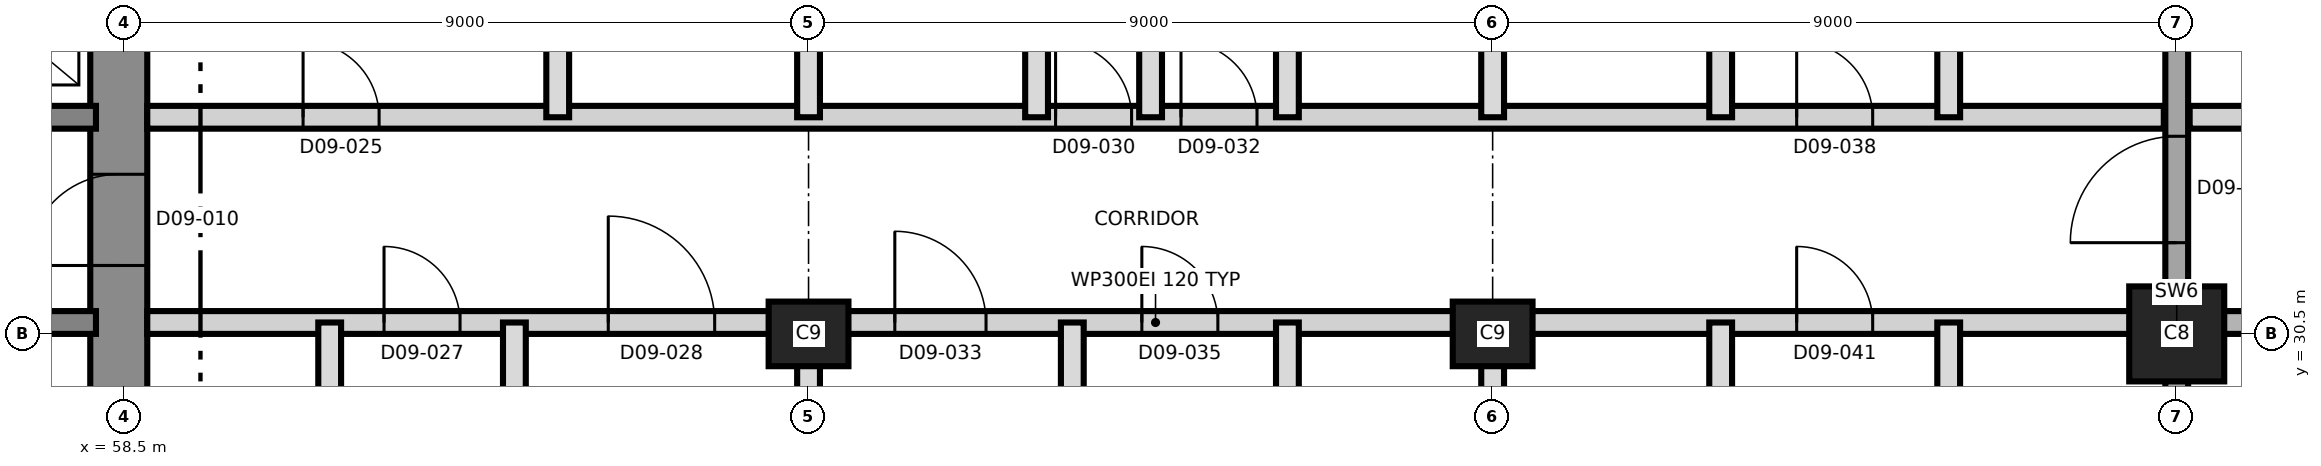
"""IFC4 building model, lengths in metres.
Left out: names, types, materials, properties, quantities, classifications, styles, units other than length and angle.
Written with IfcOpenShell. Run it as: python <this file> out.ifc"""

import sys

from ifc_helpers import new_model, si_unit, direction, frame, frame_2d, origin, origin_2d, place, context, subcontext, project, spatial, rectangle, extrude, element, fill, save


model = new_model("IFC4")
c1 = context("Model", 3, precision=1e-05, world=origin(), true_north=direction((0.0, 1.0)))
c2 = subcontext(c1, "Body", "Model", "MODEL_VIEW")
j1 = project(units=[si_unit("LENGTHUNIT", "METRE"), si_unit("PLANEANGLEUNIT", "RADIAN")], contexts=[c1])
p1 = place(None, origin())
s1 = spatial("IfcSite", under=j1, at=p1, CompositionType="ELEMENT")
p2 = place(p1, origin())
s2 = spatial("IfcBuilding", under=s1, at=p2, CompositionType="ELEMENT")
p3 = place(p2, frame((0.0, 0.0, 113.0)))
s3 = spatial("IfcBuildingStorey", under=s2, at=p3, CompositionType="ELEMENT", Elevation=113.0)
p4 = place(p3, frame((58.425, 21.125, 0.0), z_axis=(0.0, 0.0, 1.0), x_axis=(0.0, 1.0, 0.0)))
e1 = element("IfcWall", 1, at=p4, inside=s3, PredefinedType="SHEAR", context=c2, shape_type="SweptSolid", body=[
    extrude(rectangle(XDim=18.75, YDim=0.75, at=frame_2d((9.375, 0.0))), origin(), (0.0, 0.0, 1.0), 3.7),
])
p5 = place(p4, frame((10.275, 0.0, 0.0)))
e2 = element("IfcOpeningElement", 2, at=p5, cuts=e1, PredefinedType="OPENING", context=c2, shape_type="SweptSolid", body=[
    extrude(rectangle(XDim=1.2, YDim=2.1, at=frame_2d((0.6, 1.05))), frame((0.0, 0.385, 0.0), z_axis=(0.0, -1.0, 0.0), x_axis=(1.0, 0.0, 0.0)), (0.0, 0.0, 1.0), 0.77),
])
p6 = place(p3, frame((31.875, 30.65, 0.0), z_axis=(0.0, 0.0, 1.0), x_axis=(1.0, 0.0, 0.0)))
e3 = element("IfcWall", 3, at=p6, inside=s3, PredefinedType="SHEAR", context=c2, shape_type="SweptSolid", body=[
    extrude(rectangle(XDim=26.25, YDim=0.3, at=frame_2d((13.125, 0.0))), origin(), (0.0, 0.0, 1.0), 3.7),
])
p7 = place(p6, frame((24.625, 0.0, 0.0)))
e4 = element("IfcOpeningElement", 4, at=p7, cuts=e3, PredefinedType="OPENING", context=c2, shape_type="SweptSolid", body=[
    extrude(rectangle(XDim=1.0, YDim=2.1, at=frame_2d((0.5, 1.05))), frame((0.0, 0.16, 0.0), z_axis=(0.0, -1.0, 0.0), x_axis=(1.0, 0.0, 0.0)), (0.0, 0.0, 1.0), 0.32),
])
p8 = place(p6, frame((11.425, 0.0, 0.0)))
e5 = element("IfcOpeningElement", 5, at=p8, cuts=e3, PredefinedType="OPENING", context=c2, shape_type="SweptSolid", body=[
    extrude(rectangle(XDim=1.0, YDim=2.1, at=frame_2d((0.5, 1.05))), frame((0.0, 0.16, 0.0), z_axis=(0.0, -1.0, 0.0), x_axis=(1.0, 0.0, 0.0)), (0.0, 0.0, 1.0), 0.32),
])
p9 = place(p3, frame((31.875, 33.35, 0.0), z_axis=(0.0, 0.0, 1.0), x_axis=(1.0, 0.0, 0.0)))
e6 = element("IfcWall", 6, at=p9, inside=s3, PredefinedType="SHEAR", context=c2, shape_type="SweptSolid", body=[
    extrude(rectangle(XDim=26.25, YDim=0.3, at=frame_2d((13.125, 0.0))), origin(), (0.0, 0.0, 1.0), 3.7),
])
p10 = place(p9, frame((13.775, 0.0, 0.0)))
e7 = element("IfcOpeningElement", 7, at=p10, cuts=e6, PredefinedType="OPENING", context=c2, shape_type="SweptSolid", body=[
    extrude(rectangle(XDim=1.4, YDim=2.1, at=frame_2d((0.7, 1.05))), frame((0.0, 0.16, 0.0), z_axis=(0.0, -1.0, 0.0), x_axis=(1.0, 0.0, 0.0)), (0.0, 0.0, 1.0), 0.32),
])
p11 = place(p9, frame((5.25, 0.0, 0.0)))
e8 = element("IfcOpeningElement", 8, at=p11, cuts=e6, PredefinedType="OPENING", context=c2, shape_type="SweptSolid", body=[
    extrude(rectangle(XDim=1.2, YDim=2.1, at=frame_2d((0.6, 1.05))), frame((0.0, 0.16, 0.0), z_axis=(0.0, -1.0, 0.0), x_axis=(1.0, 0.0, 0.0)), (0.0, 0.0, 1.0), 0.32),
])
p12 = place(p9, frame((19.8, 0.0, 0.0)))
e9 = element("IfcOpeningElement", 9, at=p12, cuts=e6, PredefinedType="OPENING", context=c2, shape_type="SweptSolid", body=[
    extrude(rectangle(XDim=1.2, YDim=2.1, at=frame_2d((0.6, 1.05))), frame((0.0, 0.16, 0.0), z_axis=(0.0, -1.0, 0.0), x_axis=(1.0, 0.0, 0.0)), (0.0, 0.0, 1.0), 0.32),
])
for number, where, z_axis, x_axis in (
    (10, (67.5, 30.5, 0.0), (0.0, 0.0, 1.0), (1.0, 0.0, 0.0)),
    (11, (76.5, 30.5, 0.0), (0.0, 0.0, 1.0), (1.0, 0.0, 0.0)),
):
    element("IfcColumn", number, at=place(p3, frame(where, z_axis=z_axis, x_axis=x_axis)), inside=s3, PredefinedType="COLUMN", context=c2, shape_type="SweptSolid", body=[
        extrude(rectangle(XDim=1.05, YDim=0.85, at=origin_2d()), origin(), (0.0, 0.0, 1.0), 3.7),
    ])
p13 = place(p3, frame((85.5, 30.5, 0.0), z_axis=(0.0, 0.0, 1.0), x_axis=(1.0, 0.0, 0.0)))
e12 = element("IfcColumn", 12, at=p13, inside=s3, PredefinedType="COLUMN", context=c2, shape_type="SweptSolid", body=[
    extrude(rectangle(XDim=1.25, YDim=1.25, at=origin_2d()), origin(), (0.0, 0.0, 1.0), 3.7),
])
p14 = place(p3, frame((85.5, 20.35, 0.0), z_axis=(0.0, 0.0, 1.0), x_axis=(0.0, 1.0, 0.0)))
e13 = element("IfcWall", 13, at=p14, inside=s3, PredefinedType="SHEAR", context=c2, shape_type="SweptSolid", body=[
    extrude(rectangle(XDim=20.3, YDim=0.3, at=frame_2d((10.15, 0.0))), origin(), (0.0, 0.0, 1.0), 3.7),
])
p15 = place(p14, frame((11.35, 0.0, 0.0)))
e14 = element("IfcOpeningElement", 14, at=p15, cuts=e13, PredefinedType="OPENING", context=c2, shape_type="SweptSolid", body=[
    extrude(rectangle(XDim=1.4, YDim=2.1, at=frame_2d((0.7, 1.05))), frame((0.0, 0.16, 0.0), z_axis=(0.0, -1.0, 0.0), x_axis=(1.0, 0.0, 0.0)), (0.0, 0.0, 1.0), 0.32),
])
p16 = place(p3, frame((58.8, 30.65, 0.0), z_axis=(0.0, 0.0, 1.0), x_axis=(1.0, 0.0, 0.0)))
e15 = element("IfcWall", 15, at=p16, inside=s3, PredefinedType="PARTITIONING", context=c2, shape_type="SweptSolid", body=[
    extrude(rectangle(XDim=26.53, YDim=0.3, at=frame_2d((13.265, 0.0))), origin(), (0.0, 0.0, 1.0), 3.4),
])
p17 = place(p16, frame((3.115, 0.0, 0.0)))
e16 = element("IfcOpeningElement", 16, at=p17, cuts=e15, PredefinedType="OPENING", context=c2, shape_type="SweptSolid", body=[
    extrude(rectangle(XDim=1.0, YDim=2.1, at=frame_2d((0.5, 1.05))), frame((0.0, 0.16, 0.0), z_axis=(0.0, -1.0, 0.0), x_axis=(1.0, 0.0, 0.0)), (0.0, 0.0, 1.0), 0.32),
])
p18 = place(p16, frame((6.065, 0.0, 0.0)))
e17 = element("IfcOpeningElement", 17, at=p18, cuts=e15, PredefinedType="OPENING", context=c2, shape_type="SweptSolid", body=[
    extrude(rectangle(XDim=1.4, YDim=2.1, at=frame_2d((0.7, 1.05))), frame((0.0, 0.16, 0.0), z_axis=(0.0, -1.0, 0.0), x_axis=(1.0, 0.0, 0.0)), (0.0, 0.0, 1.0), 0.32),
])
p19 = place(p16, frame((9.835, 0.0, 0.0)))
e18 = element("IfcOpeningElement", 18, at=p19, cuts=e15, PredefinedType="OPENING", context=c2, shape_type="SweptSolid", body=[
    extrude(rectangle(XDim=1.2, YDim=2.1, at=frame_2d((0.6, 1.05))), frame((0.0, 0.16, 0.0), z_axis=(0.0, -1.0, 0.0), x_axis=(1.0, 0.0, 0.0)), (0.0, 0.0, 1.0), 0.32),
])
p20 = place(p16, frame((13.085, 0.0, 0.0)))
e19 = element("IfcOpeningElement", 19, at=p20, cuts=e15, PredefinedType="OPENING", context=c2, shape_type="SweptSolid", body=[
    extrude(rectangle(XDim=1.0, YDim=2.1, at=frame_2d((0.5, 1.05))), frame((0.0, 0.16, 0.0), z_axis=(0.0, -1.0, 0.0), x_axis=(1.0, 0.0, 0.0)), (0.0, 0.0, 1.0), 0.32),
])
p21 = place(p16, frame((21.7, 0.0, 0.0)))
e20 = element("IfcOpeningElement", 20, at=p21, cuts=e15, PredefinedType="OPENING", context=c2, shape_type="SweptSolid", body=[
    extrude(rectangle(XDim=1.0, YDim=2.4, at=frame_2d((0.5, 1.2))), frame((0.0, 0.16, 0.0), z_axis=(0.0, -1.0, 0.0), x_axis=(1.0, 0.0, 0.0)), (0.0, 0.0, 1.0), 0.32),
])
p22 = place(p3, frame((85.67, 30.65, 0.0), z_axis=(0.0, 0.0, 1.0), x_axis=(1.0, 0.0, 0.0)))
e21 = element("IfcWall", 21, at=p22, inside=s3, PredefinedType="SHEAR", context=c2, shape_type="SweptSolid", body=[
    extrude(rectangle(XDim=9.58, YDim=0.3, at=frame_2d((4.79, 0.0))), origin(), (0.0, 0.0, 1.0), 3.4),
])
p23 = place(p22, frame((2.08, 0.0, 0.0)))
e22 = element("IfcOpeningElement", 22, at=p23, cuts=e21, PredefinedType="OPENING", context=c2, shape_type="SweptSolid", body=[
    extrude(rectangle(XDim=1.2, YDim=2.1, at=frame_2d((0.6, 1.05))), frame((0.0, 0.16, 0.0), z_axis=(0.0, -1.0, 0.0), x_axis=(1.0, 0.0, 0.0)), (0.0, 0.0, 1.0), 0.32),
])
p24 = place(p22, frame((5.63, 0.0, 0.0)))
e23 = element("IfcOpeningElement", 23, at=p24, cuts=e21, PredefinedType="OPENING", context=c2, shape_type="SweptSolid", body=[
    extrude(rectangle(XDim=1.0, YDim=2.1, at=frame_2d((0.5, 1.05))), frame((0.0, 0.16, 0.0), z_axis=(0.0, -1.0, 0.0), x_axis=(1.0, 0.0, 0.0)), (0.0, 0.0, 1.0), 0.32),
])
p25 = place(p3, frame((58.8, 33.35, 0.0), z_axis=(0.0, 0.0, 1.0), x_axis=(1.0, 0.0, 0.0)))
e24 = element("IfcWall", 24, at=p25, inside=s3, PredefinedType="PARTITIONING", context=c2, shape_type="SweptSolid", body=[
    extrude(rectangle(XDim=26.53, YDim=0.3, at=frame_2d((13.265, 0.0))), origin(), (0.0, 0.0, 1.0), 3.4),
])
p26 = place(p25, frame((2.05, 0.0, 0.0)))
e25 = element("IfcOpeningElement", 25, at=p26, cuts=e24, PredefinedType="OPENING", context=c2, shape_type="SweptSolid", body=[
    extrude(rectangle(XDim=1.0, YDim=2.4, at=frame_2d((0.5, 1.2))), frame((0.0, 0.16, 0.0), z_axis=(0.0, -1.0, 0.0), x_axis=(1.0, 0.0, 0.0)), (0.0, 0.0, 1.0), 0.32),
])
p27 = place(p25, frame((11.95, 0.0, 0.0)))
e26 = element("IfcOpeningElement", 26, at=p27, cuts=e24, PredefinedType="OPENING", context=c2, shape_type="SweptSolid", body=[
    extrude(rectangle(XDim=1.0, YDim=2.1, at=frame_2d((0.5, 1.05))), frame((0.0, 0.16, 0.0), z_axis=(0.0, -1.0, 0.0), x_axis=(1.0, 0.0, 0.0)), (0.0, 0.0, 1.0), 0.32),
])
p28 = place(p25, frame((13.6, 0.0, 0.0)))
e27 = element("IfcOpeningElement", 27, at=p28, cuts=e24, PredefinedType="OPENING", context=c2, shape_type="SweptSolid", body=[
    extrude(rectangle(XDim=1.0, YDim=2.1, at=frame_2d((0.5, 1.05))), frame((0.0, 0.16, 0.0), z_axis=(0.0, -1.0, 0.0), x_axis=(1.0, 0.0, 0.0)), (0.0, 0.0, 1.0), 0.32),
])
p29 = place(p25, frame((21.7, 0.0, 0.0)))
e28 = element("IfcOpeningElement", 28, at=p29, cuts=e24, PredefinedType="OPENING", context=c2, shape_type="SweptSolid", body=[
    extrude(rectangle(XDim=1.0, YDim=2.4, at=frame_2d((0.5, 1.2))), frame((0.0, 0.16, 0.0), z_axis=(0.0, -1.0, 0.0), x_axis=(1.0, 0.0, 0.0)), (0.0, 0.0, 1.0), 0.32),
])
p30 = place(p3, frame((85.67, 33.35, 0.0), z_axis=(0.0, 0.0, 1.0), x_axis=(1.0, 0.0, 0.0)))
e29 = element("IfcWall", 29, at=p30, inside=s3, PredefinedType="PARTITIONING", context=c2, shape_type="SweptSolid", body=[
    extrude(rectangle(XDim=9.58, YDim=0.3, at=frame_2d((4.79, 0.0))), origin(), (0.0, 0.0, 1.0), 3.4),
])
p31 = place(p30, frame((1.83, 0.0, 0.0)))
e30 = element("IfcOpeningElement", 30, at=p31, cuts=e29, PredefinedType="OPENING", context=c2, shape_type="SweptSolid", body=[
    extrude(rectangle(XDim=1.0, YDim=2.1, at=frame_2d((0.5, 1.05))), frame((0.0, 0.16, 0.0), z_axis=(0.0, -1.0, 0.0), x_axis=(1.0, 0.0, 0.0)), (0.0, 0.0, 1.0), 0.32),
])
p32 = place(p30, frame((5.63, 0.0, 0.0)))
e31 = element("IfcOpeningElement", 31, at=p32, cuts=e29, PredefinedType="OPENING", context=c2, shape_type="SweptSolid", body=[
    extrude(rectangle(XDim=1.0, YDim=2.1, at=frame_2d((0.5, 1.05))), frame((0.0, 0.16, 0.0), z_axis=(0.0, -1.0, 0.0), x_axis=(1.0, 0.0, 0.0)), (0.0, 0.0, 1.0), 0.32),
])
p33 = place(p3, frame((61.2, 27.45, 0.0), z_axis=(0.0, 0.0, 1.0), x_axis=(0.0, 1.0, 0.0)))
e32 = element("IfcWall", 32, at=p33, inside=s3, PredefinedType="PARTITIONING", context=c2, shape_type="SweptSolid", body=[
    extrude(rectangle(XDim=3.2, YDim=0.3, at=frame_2d((1.6, 0.0))), origin(), (0.0, 0.0, 1.0), 3.4),
])
p34 = place(p3, frame((63.63, 20.35, 0.0), z_axis=(0.0, 0.0, 1.0), x_axis=(0.0, 1.0, 0.0)))
e33 = element("IfcWall", 33, at=p34, inside=s3, PredefinedType="PARTITIONING", context=c2, shape_type="SweptSolid", body=[
    extrude(rectangle(XDim=10.3, YDim=0.3, at=frame_2d((5.15, 0.0))), origin(), (0.0, 0.0, 1.0), 3.4),
])
p35 = place(p3, frame((64.2, 33.35, 0.0), z_axis=(0.0, 0.0, 1.0), x_axis=(0.0, 1.0, 0.0)))
e34 = element("IfcWall", 34, at=p35, inside=s3, PredefinedType="PARTITIONING", context=c2, shape_type="SweptSolid", body=[
    extrude(rectangle(XDim=3.5, YDim=0.3, at=frame_2d((1.75, 0.0))), origin(), (0.0, 0.0, 1.0), 3.4),
])
p36 = place(p3, frame((67.5, 20.35, 0.0), z_axis=(0.0, 0.0, 1.0), x_axis=(0.0, 1.0, 0.0)))
e35 = element("IfcWall", 35, at=p36, inside=s3, PredefinedType="PARTITIONING", context=c2, shape_type="SweptSolid", body=[
    extrude(rectangle(XDim=10.3, YDim=0.3, at=frame_2d((5.15, 0.0))), origin(), (0.0, 0.0, 1.0), 3.4),
])
p37 = place(p3, frame((67.5, 33.35, 0.0), z_axis=(0.0, 0.0, 1.0), x_axis=(0.0, 1.0, 0.0)))
e36 = element("IfcWall", 36, at=p37, inside=s3, PredefinedType="PARTITIONING", context=c2, shape_type="SweptSolid", body=[
    extrude(rectangle(XDim=7.48, YDim=0.3, at=frame_2d((3.74, 0.0))), origin(), (0.0, 0.0, 1.0), 3.4),
])
p38 = place(p3, frame((70.5, 33.35, 0.0), z_axis=(0.0, 0.0, 1.0), x_axis=(0.0, 1.0, 0.0)))
e37 = element("IfcWall", 37, at=p38, inside=s3, PredefinedType="PARTITIONING", context=c2, shape_type="SweptSolid", body=[
    extrude(rectangle(XDim=3.3, YDim=0.3, at=frame_2d((1.65, 0.0))), origin(), (0.0, 0.0, 1.0), 3.4),
])
p39 = place(p3, frame((70.97, 20.35, 0.0), z_axis=(0.0, 0.0, 1.0), x_axis=(0.0, 1.0, 0.0)))
e38 = element("IfcWall", 38, at=p39, inside=s3, PredefinedType="PARTITIONING", context=c2, shape_type="SweptSolid", body=[
    extrude(rectangle(XDim=10.3, YDim=0.3, at=frame_2d((5.15, 0.0))), origin(), (0.0, 0.0, 1.0), 3.4),
])
p40 = place(p3, frame((72.0, 33.35, 0.0), z_axis=(0.0, 0.0, 1.0), x_axis=(0.0, 1.0, 0.0)))
e39 = element("IfcWall", 39, at=p40, inside=s3, PredefinedType="PARTITIONING", context=c2, shape_type="SweptSolid", body=[
    extrude(rectangle(XDim=7.48, YDim=0.3, at=frame_2d((3.74, 0.0))), origin(), (0.0, 0.0, 1.0), 3.4),
])
for number, where, z_axis, x_axis in (
    (40, (73.8, 27.45, 0.0), (0.0, 0.0, 1.0), (0.0, 1.0, 0.0)),
    (41, (73.8, 33.35, 0.0), (0.0, 0.0, 1.0), (0.0, 1.0, 0.0)),
):
    element("IfcWall", number, at=place(p3, frame(where, z_axis=z_axis, x_axis=x_axis)), inside=s3, PredefinedType="PARTITIONING", context=c2, shape_type="SweptSolid", body=[
        extrude(rectangle(XDim=3.2, YDim=0.3, at=frame_2d((1.6, 0.0))), origin(), (0.0, 0.0, 1.0), 3.4),
    ])
p41 = place(p3, frame((76.5, 20.35, 0.0), z_axis=(0.0, 0.0, 1.0), x_axis=(0.0, 1.0, 0.0)))
e42 = element("IfcWall", 42, at=p41, inside=s3, PredefinedType="PARTITIONING", context=c2, shape_type="SweptSolid", body=[
    extrude(rectangle(XDim=10.3, YDim=0.3, at=frame_2d((5.15, 0.0))), origin(), (0.0, 0.0, 1.0), 3.4),
])
p42 = place(p3, frame((76.5, 33.35, 0.0), z_axis=(0.0, 0.0, 1.0), x_axis=(0.0, 1.0, 0.0)))
e43 = element("IfcWall", 43, at=p42, inside=s3, PredefinedType="PARTITIONING", context=c2, shape_type="SweptSolid", body=[
    extrude(rectangle(XDim=7.48, YDim=0.3, at=frame_2d((3.74, 0.0))), origin(), (0.0, 0.0, 1.0), 3.4),
])
for number, where, z_axis, x_axis in (
    (44, (79.5, 27.35, 0.0), (0.0, 0.0, 1.0), (0.0, 1.0, 0.0)),
    (45, (79.5, 33.35, 0.0), (0.0, 0.0, 1.0), (0.0, 1.0, 0.0)),
    (46, (82.5, 27.35, 0.0), (0.0, 0.0, 1.0), (0.0, 1.0, 0.0)),
    (47, (82.5, 33.35, 0.0), (0.0, 0.0, 1.0), (0.0, 1.0, 0.0)),
):
    element("IfcWall", number, at=place(p3, frame(where, z_axis=z_axis, x_axis=x_axis)), inside=s3, PredefinedType="PARTITIONING", context=c2, shape_type="SweptSolid", body=[
        extrude(rectangle(XDim=3.3, YDim=0.3, at=frame_2d((1.65, 0.0))), origin(), (0.0, 0.0, 1.0), 3.4),
    ])
p43 = place(p5, origin())
e48 = element("IfcDoor", 48, at=p43, inside=s3, OperationType="SINGLE_SWING_LEFT", PredefinedType="DOOR", context=c2, shape_type="SweptSolid", body=[
    extrude(rectangle(XDim=1.2, YDim=2.1, at=frame_2d((0.6, 1.05))), frame((0.0, 0.025, 0.0), z_axis=(0.0, -1.0, 0.0), x_axis=(1.0, 0.0, 0.0)), (0.0, 0.0, 1.0), 0.05),
])
fill(e2, e48)
p44 = place(p26, origin())
e49 = element("IfcDoor", 49, at=p44, inside=s3, OperationType="SINGLE_SWING_LEFT", PredefinedType="DOOR", context=c2, shape_type="SweptSolid", body=[
    extrude(rectangle(XDim=1.0, YDim=2.4, at=frame_2d((0.5, 1.2))), frame((0.0, 0.025, 0.0), z_axis=(0.0, -1.0, 0.0), x_axis=(1.0, 0.0, 0.0)), (0.0, 0.0, 1.0), 0.05),
])
fill(e25, e49)
p45 = place(p17, origin())
e50 = element("IfcDoor", 50, at=p45, inside=s3, OperationType="SINGLE_SWING_RIGHT", PredefinedType="DOOR", context=c2, shape_type="SweptSolid", body=[
    extrude(rectangle(XDim=1.0, YDim=2.1, at=frame_2d((0.5, 1.05))), frame((0.0, 0.025, 0.0), z_axis=(0.0, -1.0, 0.0), x_axis=(1.0, 0.0, 0.0)), (0.0, 0.0, 1.0), 0.05),
])
fill(e16, e50)
p46 = place(p18, origin())
e51 = element("IfcDoor", 51, at=p46, inside=s3, OperationType="SINGLE_SWING_LEFT", PredefinedType="DOOR", context=c2, shape_type="SweptSolid", body=[
    extrude(rectangle(XDim=1.4, YDim=2.1, at=frame_2d((0.7, 1.05))), frame((0.0, 0.025, 0.0), z_axis=(0.0, -1.0, 0.0), x_axis=(1.0, 0.0, 0.0)), (0.0, 0.0, 1.0), 0.05),
])
fill(e17, e51)
p47 = place(p27, origin())
e52 = element("IfcDoor", 52, at=p47, inside=s3, OperationType="SINGLE_SWING_RIGHT", PredefinedType="DOOR", context=c2, shape_type="SweptSolid", body=[
    extrude(rectangle(XDim=1.0, YDim=2.1, at=frame_2d((0.5, 1.05))), frame((0.0, 0.025, 0.0), z_axis=(0.0, -1.0, 0.0), x_axis=(1.0, 0.0, 0.0)), (0.0, 0.0, 1.0), 0.05),
])
fill(e26, e52)
p48 = place(p28, origin())
e53 = element("IfcDoor", 53, at=p48, inside=s3, OperationType="SINGLE_SWING_LEFT", PredefinedType="DOOR", context=c2, shape_type="SweptSolid", body=[
    extrude(rectangle(XDim=1.0, YDim=2.1, at=frame_2d((0.5, 1.05))), frame((0.0, 0.025, 0.0), z_axis=(0.0, -1.0, 0.0), x_axis=(1.0, 0.0, 0.0)), (0.0, 0.0, 1.0), 0.05),
])
fill(e27, e53)
p49 = place(p19, origin())
e54 = element("IfcDoor", 54, at=p49, inside=s3, OperationType="SINGLE_SWING_LEFT", PredefinedType="DOOR", context=c2, shape_type="SweptSolid", body=[
    extrude(rectangle(XDim=1.2, YDim=2.1, at=frame_2d((0.6, 1.05))), frame((0.0, 0.025, 0.0), z_axis=(0.0, -1.0, 0.0), x_axis=(1.0, 0.0, 0.0)), (0.0, 0.0, 1.0), 0.05),
])
fill(e18, e54)
p50 = place(p20, origin())
e55 = element("IfcDoor", 55, at=p50, inside=s3, OperationType="SINGLE_SWING_LEFT", PredefinedType="DOOR", context=c2, shape_type="SweptSolid", body=[
    extrude(rectangle(XDim=1.0, YDim=2.1, at=frame_2d((0.5, 1.05))), frame((0.0, 0.025, 0.0), z_axis=(0.0, -1.0, 0.0), x_axis=(1.0, 0.0, 0.0)), (0.0, 0.0, 1.0), 0.05),
])
fill(e19, e55)
p51 = place(p29, origin())
e56 = element("IfcDoor", 56, at=p51, inside=s3, OperationType="SINGLE_SWING_LEFT", PredefinedType="DOOR", context=c2, shape_type="SweptSolid", body=[
    extrude(rectangle(XDim=1.0, YDim=2.4, at=frame_2d((0.5, 1.2))), frame((0.0, 0.025, 0.0), z_axis=(0.0, -1.0, 0.0), x_axis=(1.0, 0.0, 0.0)), (0.0, 0.0, 1.0), 0.05),
])
fill(e28, e56)
p52 = place(p21, origin())
e57 = element("IfcDoor", 57, at=p52, inside=s3, OperationType="SINGLE_SWING_LEFT", PredefinedType="DOOR", context=c2, shape_type="SweptSolid", body=[
    extrude(rectangle(XDim=1.0, YDim=2.4, at=frame_2d((0.5, 1.2))), frame((0.0, 0.025, 0.0), z_axis=(0.0, -1.0, 0.0), x_axis=(1.0, 0.0, 0.0)), (0.0, 0.0, 1.0), 0.05),
])
fill(e20, e57)
p53 = place(p15, origin())
e58 = element("IfcDoor", 58, at=p53, inside=s3, OperationType="SINGLE_SWING_RIGHT", PredefinedType="DOOR", context=c2, shape_type="SweptSolid", body=[
    extrude(rectangle(XDim=1.4, YDim=2.1, at=frame_2d((0.7, 1.05))), frame((0.0, 0.025, 0.0), z_axis=(0.0, -1.0, 0.0), x_axis=(1.0, 0.0, 0.0)), (0.0, 0.0, 1.0), 0.05),
])
fill(e14, e58)
save(model, sys.argv[1])
